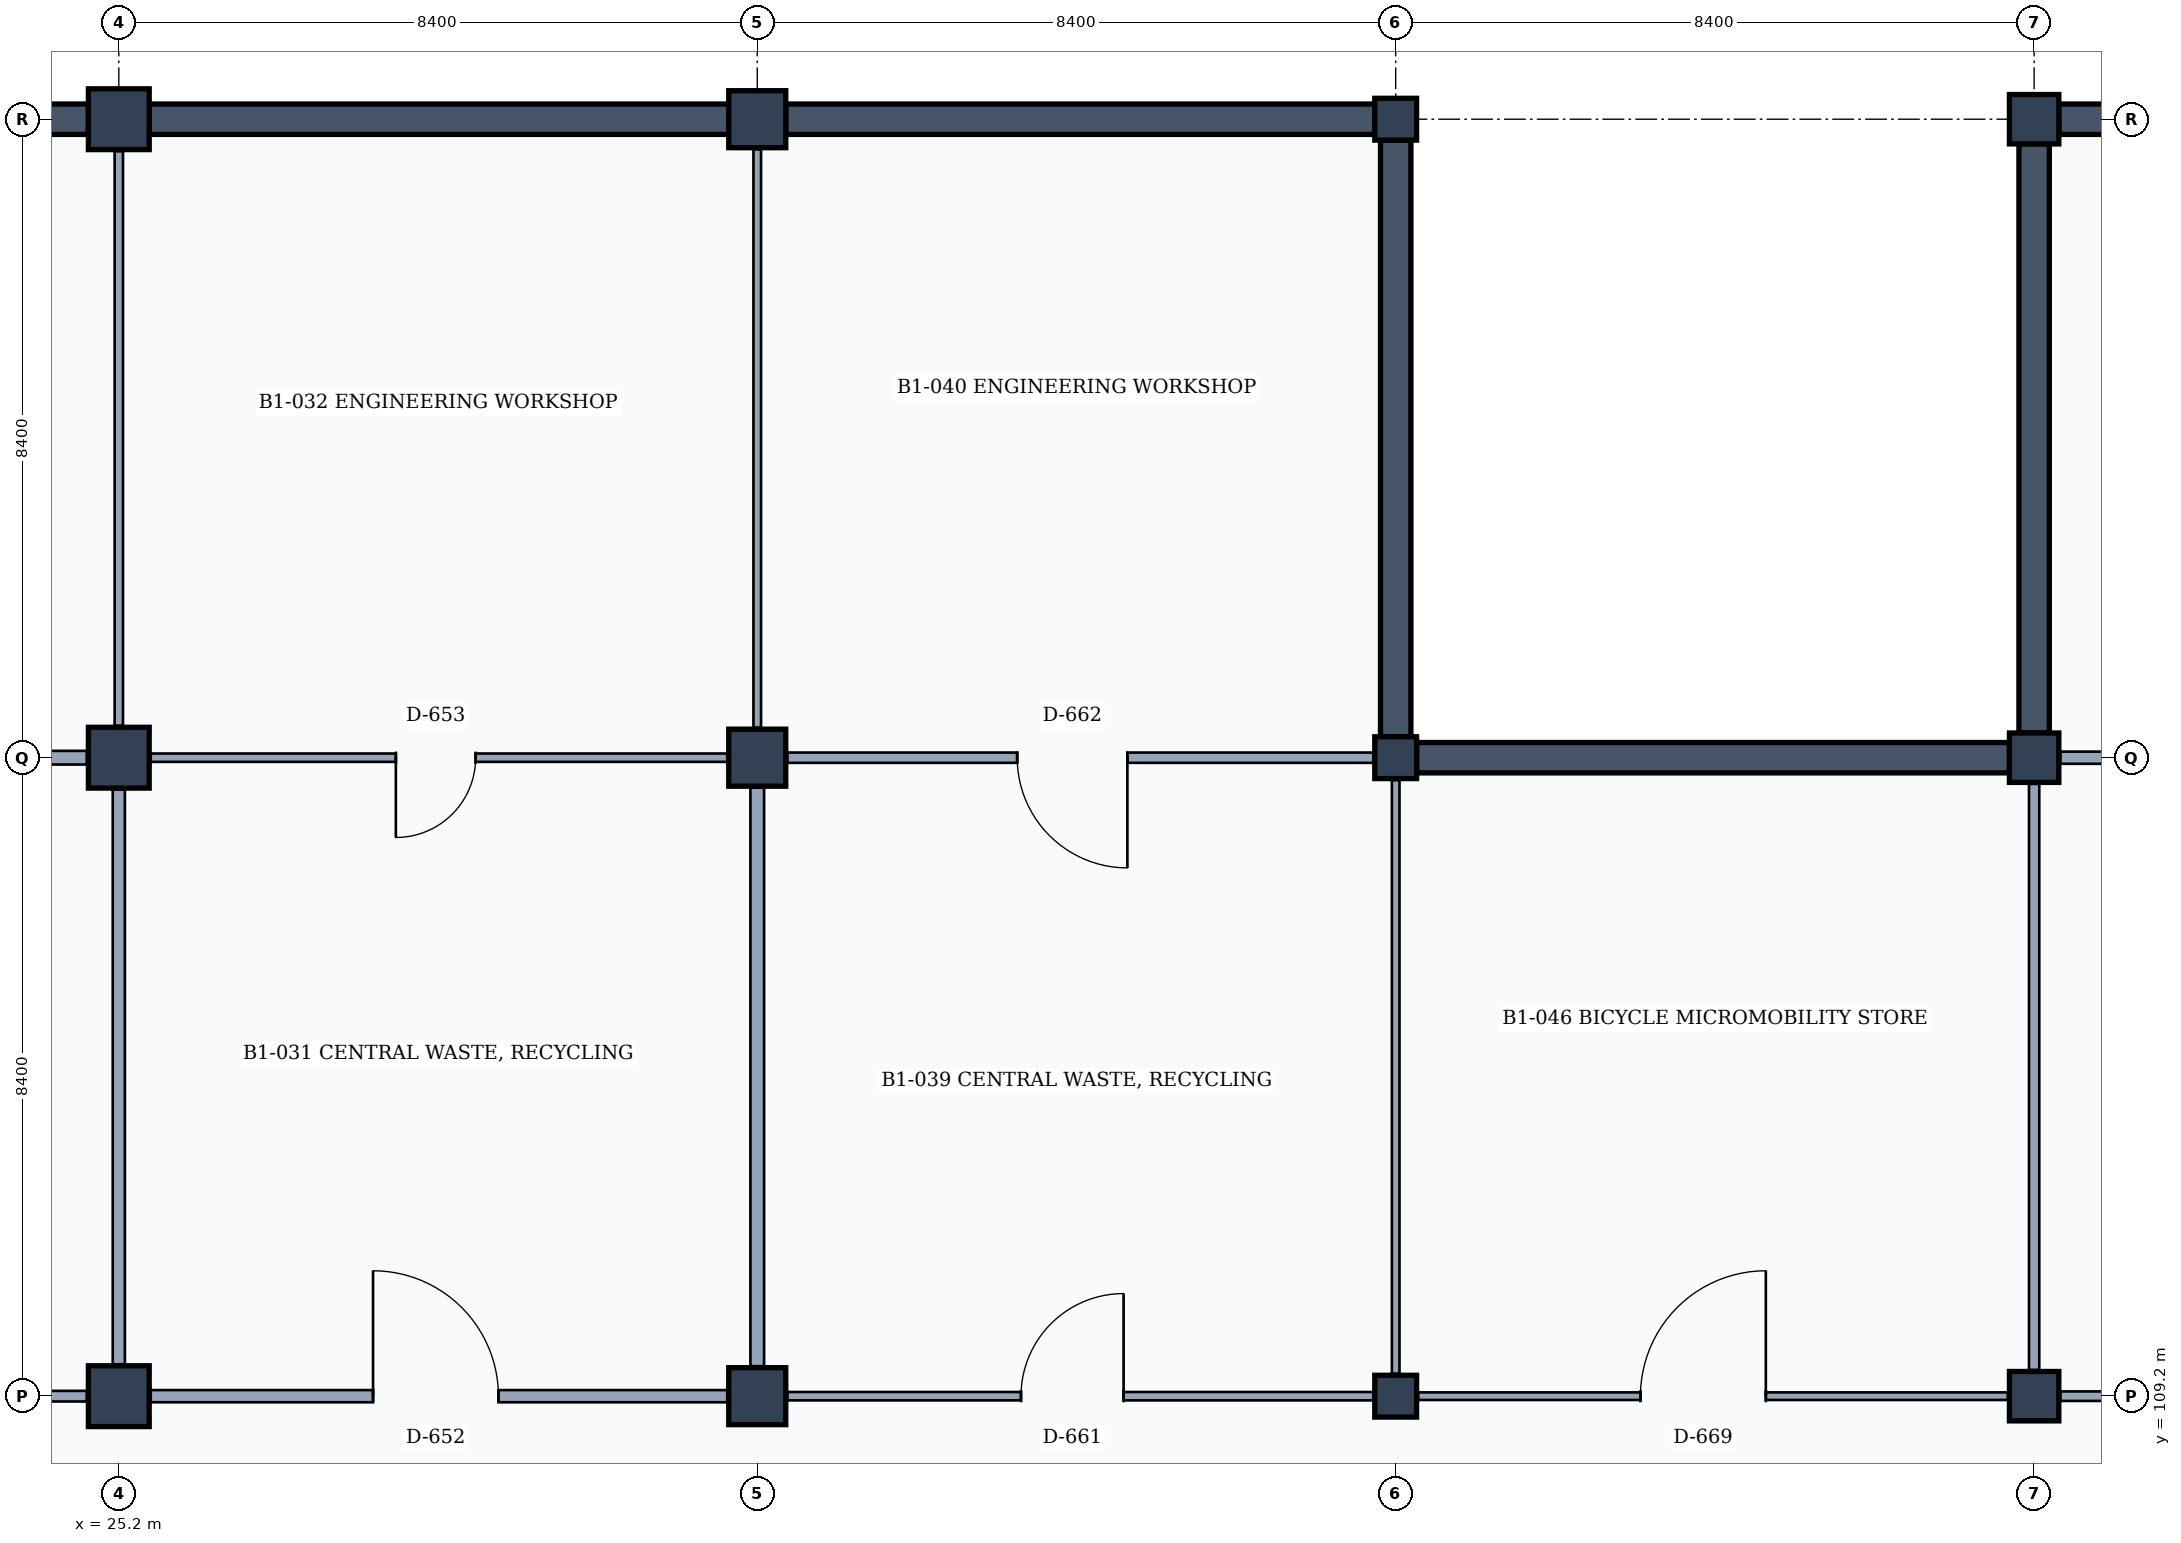
"""IFC4 building model, lengths in metres.
Left out: names, types, materials, properties, quantities, classifications, styles, units other than length and angle.
Written with IfcOpenShell. Run it as: python <this file> out.ifc"""

import sys

from ifc_helpers import new_model, si_unit, direction, frame, frame_2d, origin, origin_2d, place, context, subcontext, project, spatial, rectangle, extrude, element, fill, save


model = new_model("IFC4")
c1 = context("Model", 3, precision=1e-05, world=origin(), true_north=direction((0.0, 1.0)))
c2 = subcontext(c1, "Body", "Model", "MODEL_VIEW")
j1 = project(units=[si_unit("LENGTHUNIT", "METRE"), si_unit("PLANEANGLEUNIT", "RADIAN")], contexts=[c1])
p1 = place(None, origin())
s1 = spatial("IfcSite", under=j1, at=p1, CompositionType="ELEMENT")
p2 = place(p1, origin())
s2 = spatial("IfcBuilding", under=s1, at=p2, CompositionType="ELEMENT")
p3 = place(p2, frame((0.0, 0.0, -4.2)))
s3 = spatial("IfcBuildingStorey", under=s2, at=p3, CompositionType="ELEMENT", Elevation=-4.2)
for number, where, z_axis, x_axis in (
    (1, (25.2, 109.2, 0.0), (0.0, 0.0, 1.0), (1.0, 0.0, 0.0)),
    (2, (25.2, 117.6, 0.0), (0.0, 0.0, 1.0), (1.0, 0.0, 0.0)),
    (3, (25.2, 126.0, 0.0), (0.0, 0.0, 1.0), (1.0, 0.0, 0.0)),
):
    element("IfcColumn", number, at=place(p3, frame(where, z_axis=z_axis, x_axis=x_axis)), inside=s3, PredefinedType="COLUMN", context=c2, shape_type="SweptSolid", body=[
        extrude(rectangle(XDim=0.8, YDim=0.8, at=origin_2d()), origin(), (0.0, 0.0, 1.0), 4.2),
    ])
for number, where, z_axis, x_axis in (
    (4, (33.6, 109.2, 0.0), (0.0, 0.0, 1.0), (1.0, 0.0, 0.0)),
    (5, (33.6, 117.6, 0.0), (0.0, 0.0, 1.0), (1.0, 0.0, 0.0)),
    (6, (33.6, 126.0, 0.0), (0.0, 0.0, 1.0), (1.0, 0.0, 0.0)),
):
    element("IfcColumn", number, at=place(p3, frame(where, z_axis=z_axis, x_axis=x_axis)), inside=s3, PredefinedType="COLUMN", context=c2, shape_type="SweptSolid", body=[
        extrude(rectangle(XDim=0.75, YDim=0.75, at=origin_2d()), origin(), (0.0, 0.0, 1.0), 4.2),
    ])
for number, where, z_axis, x_axis in (
    (7, (42.0, 109.2, 0.0), (0.0, 0.0, 1.0), (1.0, 0.0, 0.0)),
    (8, (42.0, 117.6, 0.0), (0.0, 0.0, 1.0), (1.0, 0.0, 0.0)),
    (9, (42.0, 126.0, 0.0), (0.0, 0.0, 1.0), (1.0, 0.0, 0.0)),
):
    element("IfcColumn", number, at=place(p3, frame(where, z_axis=z_axis, x_axis=x_axis)), inside=s3, PredefinedType="COLUMN", context=c2, shape_type="SweptSolid", body=[
        extrude(rectangle(XDim=0.55, YDim=0.55, at=origin_2d()), origin(), (0.0, 0.0, 1.0), 4.2),
    ])
for number, where, z_axis, x_axis in (
    (10, (50.4, 109.2, 0.0), (0.0, 0.0, 1.0), (1.0, 0.0, 0.0)),
    (11, (50.4, 117.6, 0.0), (0.0, 0.0, 1.0), (1.0, 0.0, 0.0)),
    (12, (50.4, 126.0, 0.0), (0.0, 0.0, 1.0), (1.0, 0.0, 0.0)),
):
    element("IfcColumn", number, at=place(p3, frame(where, z_axis=z_axis, x_axis=x_axis)), inside=s3, PredefinedType="COLUMN", context=c2, shape_type="SweptSolid", body=[
        extrude(rectangle(XDim=0.65, YDim=0.65, at=origin_2d()), origin(), (0.0, 0.0, 1.0), 4.2),
    ])
p4 = place(p3, frame((17.2, 126.0, 0.0), z_axis=(0.0, 0.0, 1.0), x_axis=(1.0, 0.0, 0.0)))
e13 = element("IfcWall", 13, at=p4, inside=s3, PredefinedType="STANDARD", context=c2, shape_type="SweptSolid", body=[
    extrude(rectangle(XDim=7.6, YDim=0.4, at=frame_2d((3.8, 0.0))), origin(), (0.0, 0.0, 1.0), 3.88),
])
p5 = place(p3, frame((25.6, 126.0, 0.0), z_axis=(0.0, 0.0, 1.0), x_axis=(1.0, 0.0, 0.0)))
e14 = element("IfcWall", 14, at=p5, inside=s3, PredefinedType="STANDARD", context=c2, shape_type="SweptSolid", body=[
    extrude(rectangle(XDim=7.625, YDim=0.4, at=frame_2d((3.812, 0.0))), origin(), (0.0, 0.0, 1.0), 3.88),
])
p6 = place(p3, frame((33.975, 126.0, 0.0), z_axis=(0.0, 0.0, 1.0), x_axis=(1.0, 0.0, 0.0)))
e15 = element("IfcWall", 15, at=p6, inside=s3, PredefinedType="STANDARD", context=c2, shape_type="SweptSolid", body=[
    extrude(rectangle(XDim=7.75, YDim=0.4, at=frame_2d((3.875, 0.0))), origin(), (0.0, 0.0, 1.0), 3.88),
])
p7 = place(p3, frame((42.0, 125.725, 0.0), z_axis=(0.0, 0.0, 1.0), x_axis=(0.0, -1.0, 0.0)))
e16 = element("IfcWall", 16, at=p7, inside=s3, PredefinedType="STANDARD", context=c2, shape_type="SweptSolid", body=[
    extrude(rectangle(XDim=7.85, YDim=0.4, at=frame_2d((3.925, 0.0))), origin(), (0.0, 0.0, 1.0), 3.88),
])
p8 = place(p3, frame((42.275, 117.6, 0.0), z_axis=(0.0, 0.0, 1.0), x_axis=(1.0, 0.0, 0.0)))
e17 = element("IfcWall", 17, at=p8, inside=s3, PredefinedType="STANDARD", context=c2, shape_type="SweptSolid", body=[
    extrude(rectangle(XDim=7.8, YDim=0.4, at=frame_2d((3.9, 0.0))), origin(), (0.0, 0.0, 1.0), 3.88),
])
for number, where, z_axis, x_axis in (
    (18, (50.725, 126.0, 0.0), (0.0, 0.0, 1.0), (1.0, 0.0, 0.0)),
    (19, (50.4, 117.925, 0.0), (0.0, 0.0, 1.0), (0.0, 1.0, 0.0)),
):
    element("IfcWall", number, at=place(p3, frame(where, z_axis=z_axis, x_axis=x_axis)), inside=s3, PredefinedType="STANDARD", context=c2, shape_type="SweptSolid", body=[
        extrude(rectangle(XDim=7.75, YDim=0.4, at=frame_2d((3.875, 0.0))), origin(), (0.0, 0.0, 1.0), 3.88),
    ])
p9 = place(p3, frame((17.245, 109.2, 0.0), z_axis=(0.0, 0.0, 1.0), x_axis=(1.0, 0.0, 0.0)))
e20 = element("IfcWall", 20, at=p9, inside=s3, PredefinedType="PARTITIONING", context=c2, shape_type="SweptSolid", body=[
    extrude(rectangle(XDim=7.535, YDim=0.14, at=frame_2d((3.768, 0.0))), origin(), (0.0, 0.0, 1.0), 3.05),
])
p10 = place(p9, frame((3.025, 0.0, 0.0)))
e21 = element("IfcOpeningElement", 21, at=p10, cuts=e20, PredefinedType="OPENING", context=c2, shape_type="SweptSolid", body=[
    extrude(rectangle(XDim=1.45, YDim=2.35, at=frame_2d((0.725, 1.175))), frame((0.0, 0.08, 0.0), z_axis=(0.0, -1.0, 0.0), x_axis=(1.0, 0.0, 0.0)), (0.0, 0.0, 1.0), 0.16),
])
p11 = place(p3, frame((25.2, 109.62, 0.0), z_axis=(0.0, 0.0, 1.0), x_axis=(0.0, 1.0, 0.0)))
e22 = element("IfcWall", 22, at=p11, inside=s3, PredefinedType="PARTITIONING", context=c2, shape_type="SweptSolid", body=[
    extrude(rectangle(XDim=7.56, YDim=0.16, at=frame_2d((3.78, 0.0))), origin(), (0.0, 0.0, 1.0), 3.25),
])
p12 = place(p3, frame((17.22, 117.6, 0.0), z_axis=(0.0, 0.0, 1.0), x_axis=(1.0, 0.0, 0.0)))
e23 = element("IfcWall", 23, at=p12, inside=s3, PredefinedType="PARTITIONING", context=c2, shape_type="SweptSolid", body=[
    extrude(rectangle(XDim=7.56, YDim=0.18, at=frame_2d((3.78, 0.0))), origin(), (0.0, 0.0, 1.0), 3.05),
])
p13 = place(p12, frame((3.25, 0.0, 0.0)))
e24 = element("IfcOpeningElement", 24, at=p13, cuts=e23, PredefinedType="OPENING", context=c2, shape_type="SweptSolid", body=[
    extrude(rectangle(XDim=1.0, YDim=2.15, at=frame_2d((0.5, 1.075))), frame((0.0, 0.1, 0.0), z_axis=(0.0, -1.0, 0.0), x_axis=(1.0, 0.0, 0.0)), (0.0, 0.0, 1.0), 0.2),
])
p14 = place(p3, frame((25.2, 118.02, 0.0), z_axis=(0.0, 0.0, 1.0), x_axis=(0.0, 1.0, 0.0)))
e25 = element("IfcWall", 25, at=p14, inside=s3, PredefinedType="PARTITIONING", context=c2, shape_type="SweptSolid", body=[
    extrude(rectangle(XDim=7.56, YDim=0.11, at=frame_2d((3.78, 0.0))), origin(), (0.0, 0.0, 1.0), 3.25),
])
p15 = place(p3, frame((25.62, 109.2, 0.0), z_axis=(0.0, 0.0, 1.0), x_axis=(1.0, 0.0, 0.0)))
e26 = element("IfcWall", 26, at=p15, inside=s3, PredefinedType="PARTITIONING", context=c2, shape_type="SweptSolid", body=[
    extrude(rectangle(XDim=7.585, YDim=0.16, at=frame_2d((3.792, 0.0))), origin(), (0.0, 0.0, 1.0), 3.05),
])
p16 = place(p15, frame((2.925, 0.0, 0.0)))
e27 = element("IfcOpeningElement", 27, at=p16, cuts=e26, PredefinedType="OPENING", context=c2, shape_type="SweptSolid", body=[
    extrude(rectangle(XDim=1.65, YDim=2.25, at=frame_2d((0.825, 1.125))), frame((0.0, 0.09, 0.0), z_axis=(0.0, -1.0, 0.0), x_axis=(1.0, 0.0, 0.0)), (0.0, 0.0, 1.0), 0.18),
])
p17 = place(p3, frame((33.6, 109.595, 0.0), z_axis=(0.0, 0.0, 1.0), x_axis=(0.0, 1.0, 0.0)))
e28 = element("IfcWall", 28, at=p17, inside=s3, PredefinedType="PARTITIONING", context=c2, shape_type="SweptSolid", body=[
    extrude(rectangle(XDim=7.61, YDim=0.18, at=frame_2d((3.805, 0.0))), origin(), (0.0, 0.0, 1.0), 3.25),
])
p18 = place(p3, frame((25.62, 117.6, 0.0), z_axis=(0.0, 0.0, 1.0), x_axis=(1.0, 0.0, 0.0)))
e29 = element("IfcWall", 29, at=p18, inside=s3, PredefinedType="PARTITIONING", context=c2, shape_type="SweptSolid", body=[
    extrude(rectangle(XDim=7.585, YDim=0.11, at=frame_2d((3.792, 0.0))), origin(), (0.0, 0.0, 1.0), 3.05),
])
p19 = place(p18, frame((3.225, 0.0, 0.0)))
e30 = element("IfcOpeningElement", 30, at=p19, cuts=e29, PredefinedType="OPENING", context=c2, shape_type="SweptSolid", body=[
    extrude(rectangle(XDim=1.05, YDim=2.2, at=frame_2d((0.525, 1.1))), frame((0.0, 0.065, 0.0), z_axis=(0.0, -1.0, 0.0), x_axis=(1.0, 0.0, 0.0)), (0.0, 0.0, 1.0), 0.13),
])
p20 = place(p3, frame((33.6, 117.995, 0.0), z_axis=(0.0, 0.0, 1.0), x_axis=(0.0, 1.0, 0.0)))
e31 = element("IfcWall", 31, at=p20, inside=s3, PredefinedType="MOVABLE", context=c2, shape_type="SweptSolid", body=[
    extrude(rectangle(XDim=7.61, YDim=0.1, at=frame_2d((3.805, 0.0))), origin(), (0.0, 0.0, 1.0), 3.25),
])
p21 = place(p3, frame((33.995, 109.2, 0.0), z_axis=(0.0, 0.0, 1.0), x_axis=(1.0, 0.0, 0.0)))
e32 = element("IfcWall", 32, at=p21, inside=s3, PredefinedType="PARTITIONING", context=c2, shape_type="SweptSolid", body=[
    extrude(rectangle(XDim=7.71, YDim=0.11, at=frame_2d((3.855, 0.0))), origin(), (0.0, 0.0, 1.0), 3.05),
])
p22 = place(p21, frame((3.075, 0.0, 0.0)))
e33 = element("IfcOpeningElement", 33, at=p22, cuts=e32, PredefinedType="OPENING", context=c2, shape_type="SweptSolid", body=[
    extrude(rectangle(XDim=1.35, YDim=2.25, at=frame_2d((0.675, 1.125))), frame((0.0, 0.065, 0.0), z_axis=(0.0, -1.0, 0.0), x_axis=(1.0, 0.0, 0.0)), (0.0, 0.0, 1.0), 0.13),
])
p23 = place(p3, frame((42.0, 109.495, 0.0), z_axis=(0.0, 0.0, 1.0), x_axis=(0.0, 1.0, 0.0)))
e34 = element("IfcWall", 34, at=p23, inside=s3, PredefinedType="MOVABLE", context=c2, shape_type="SweptSolid", body=[
    extrude(rectangle(XDim=7.81, YDim=0.1, at=frame_2d((3.905, 0.0))), origin(), (0.0, 0.0, 1.0), 3.25),
])
p24 = place(p3, frame((33.995, 117.6, 0.0), z_axis=(0.0, 0.0, 1.0), x_axis=(1.0, 0.0, 0.0)))
e35 = element("IfcWall", 35, at=p24, inside=s3, PredefinedType="PARTITIONING", context=c2, shape_type="SweptSolid", body=[
    extrude(rectangle(XDim=7.71, YDim=0.135, at=frame_2d((3.855, 0.0))), origin(), (0.0, 0.0, 1.0), 3.05),
])
p25 = place(p24, frame((3.025, 0.0, 0.0)))
e36 = element("IfcOpeningElement", 36, at=p25, cuts=e35, PredefinedType="OPENING", context=c2, shape_type="SweptSolid", body=[
    extrude(rectangle(XDim=1.45, YDim=2.35, at=frame_2d((0.725, 1.175))), frame((0.0, 0.077, 0.0), z_axis=(0.0, -1.0, 0.0), x_axis=(1.0, 0.0, 0.0)), (0.0, 0.0, 1.0), 0.155),
])
p26 = place(p3, frame((42.295, 109.2, 0.0), z_axis=(0.0, 0.0, 1.0), x_axis=(1.0, 0.0, 0.0)))
e37 = element("IfcWall", 37, at=p26, inside=s3, PredefinedType="MOVABLE", context=c2, shape_type="SweptSolid", body=[
    extrude(rectangle(XDim=7.76, YDim=0.1, at=frame_2d((3.88, 0.0))), origin(), (0.0, 0.0, 1.0), 3.03),
])
p27 = place(p26, frame((2.925, 0.0, 0.0)))
e38 = element("IfcOpeningElement", 38, at=p27, cuts=e37, PredefinedType="OPENING", context=c2, shape_type="SweptSolid", body=[
    extrude(rectangle(XDim=1.65, YDim=2.25, at=frame_2d((0.825, 1.125))), frame((0.0, 0.06, 0.0), z_axis=(0.0, -1.0, 0.0), x_axis=(1.0, 0.0, 0.0)), (0.0, 0.0, 1.0), 0.12),
])
p28 = place(p3, frame((50.4, 109.545, 0.0), z_axis=(0.0, 0.0, 1.0), x_axis=(0.0, 1.0, 0.0)))
e39 = element("IfcWall", 39, at=p28, inside=s3, PredefinedType="PARTITIONING", context=c2, shape_type="SweptSolid", body=[
    extrude(rectangle(XDim=7.71, YDim=0.135, at=frame_2d((3.855, 0.0))), origin(), (0.0, 0.0, 1.0), 3.23),
])
p29 = place(p3, frame((50.745, 109.2, 0.0), z_axis=(0.0, 0.0, 1.0), x_axis=(1.0, 0.0, 0.0)))
e40 = element("IfcWall", 40, at=p29, inside=s3, PredefinedType="PARTITIONING", context=c2, shape_type="SweptSolid", body=[
    extrude(rectangle(XDim=7.71, YDim=0.125, at=frame_2d((3.855, 0.0))), origin(), (0.0, 0.0, 1.0), 2.93),
])
p30 = place(p29, frame((2.8, 0.0, 0.0)))
e41 = element("IfcOpeningElement", 41, at=p30, cuts=e40, PredefinedType="OPENING", context=c2, shape_type="SweptSolid", body=[
    extrude(rectangle(XDim=1.9, YDim=2.4, at=frame_2d((0.95, 1.2))), frame((0.0, 0.073, 0.0), z_axis=(0.0, -1.0, 0.0), x_axis=(1.0, 0.0, 0.0)), (0.0, 0.0, 1.0), 0.145),
])
p31 = place(p3, frame((50.745, 117.6, 0.0), z_axis=(0.0, 0.0, 1.0), x_axis=(1.0, 0.0, 0.0)))
e42 = element("IfcWall", 42, at=p31, inside=s3, PredefinedType="PARTITIONING", context=c2, shape_type="SweptSolid", body=[
    extrude(rectangle(XDim=7.71, YDim=0.16, at=frame_2d((3.855, 0.0))), origin(), (0.0, 0.0, 1.0), 2.93),
])
p32 = place(p31, frame((3.3, 0.0, 0.0)))
e43 = element("IfcOpeningElement", 43, at=p32, cuts=e42, PredefinedType="OPENING", context=c2, shape_type="SweptSolid", body=[
    extrude(rectangle(XDim=0.9, YDim=2.1, at=frame_2d((0.45, 1.05))), frame((0.0, 0.09, 0.0), z_axis=(0.0, -1.0, 0.0), x_axis=(1.0, 0.0, 0.0)), (0.0, 0.0, 1.0), 0.18),
])
p33 = place(p16, origin())
e44 = element("IfcDoor", 44, at=p33, inside=s3, OperationType="SINGLE_SWING_LEFT", PredefinedType="DOOR", context=c2, shape_type="SweptSolid", body=[
    extrude(rectangle(XDim=1.65, YDim=2.25, at=frame_2d((0.825, 1.125))), frame((0.0, 0.025, 0.0), z_axis=(0.0, -1.0, 0.0), x_axis=(1.0, 0.0, 0.0)), (0.0, 0.0, 1.0), 0.05),
])
fill(e27, e44)
p34 = place(p19, frame((1.05, 0.0, 0.0), z_axis=(0.0, 0.0, 1.0), x_axis=(-1.0, 0.0, 0.0)))
e45 = element("IfcDoor", 45, at=p34, inside=s3, OperationType="SINGLE_SWING_RIGHT", PredefinedType="DOOR", context=c2, shape_type="SweptSolid", body=[
    extrude(rectangle(XDim=1.05, YDim=2.2, at=frame_2d((0.525, 1.1))), frame((0.0, 0.025, 0.0), z_axis=(0.0, -1.0, 0.0), x_axis=(1.0, 0.0, 0.0)), (0.0, 0.0, 1.0), 0.05),
])
fill(e30, e45)
p35 = place(p22, origin())
e46 = element("IfcDoor", 46, at=p35, inside=s3, OperationType="SINGLE_SWING_RIGHT", PredefinedType="DOOR", context=c2, shape_type="SweptSolid", body=[
    extrude(rectangle(XDim=1.35, YDim=2.25, at=frame_2d((0.675, 1.125))), frame((0.0, 0.025, 0.0), z_axis=(0.0, -1.0, 0.0), x_axis=(1.0, 0.0, 0.0)), (0.0, 0.0, 1.0), 0.05),
])
fill(e33, e46)
p36 = place(p25, frame((1.45, 0.0, 0.0), z_axis=(0.0, 0.0, 1.0), x_axis=(-1.0, 0.0, 0.0)))
e47 = element("IfcDoor", 47, at=p36, inside=s3, OperationType="SINGLE_SWING_LEFT", PredefinedType="DOOR", context=c2, shape_type="SweptSolid", body=[
    extrude(rectangle(XDim=1.45, YDim=2.35, at=frame_2d((0.725, 1.175))), frame((0.0, 0.025, 0.0), z_axis=(0.0, -1.0, 0.0), x_axis=(1.0, 0.0, 0.0)), (0.0, 0.0, 1.0), 0.05),
])
fill(e36, e47)
p37 = place(p27, origin())
e48 = element("IfcDoor", 48, at=p37, inside=s3, OperationType="SINGLE_SWING_RIGHT", PredefinedType="DOOR", context=c2, shape_type="SweptSolid", body=[
    extrude(rectangle(XDim=1.65, YDim=2.25, at=frame_2d((0.825, 1.125))), frame((0.0, 0.025, 0.0), z_axis=(0.0, -1.0, 0.0), x_axis=(1.0, 0.0, 0.0)), (0.0, 0.0, 1.0), 0.05),
])
fill(e38, e48)
save(model, sys.argv[1])
